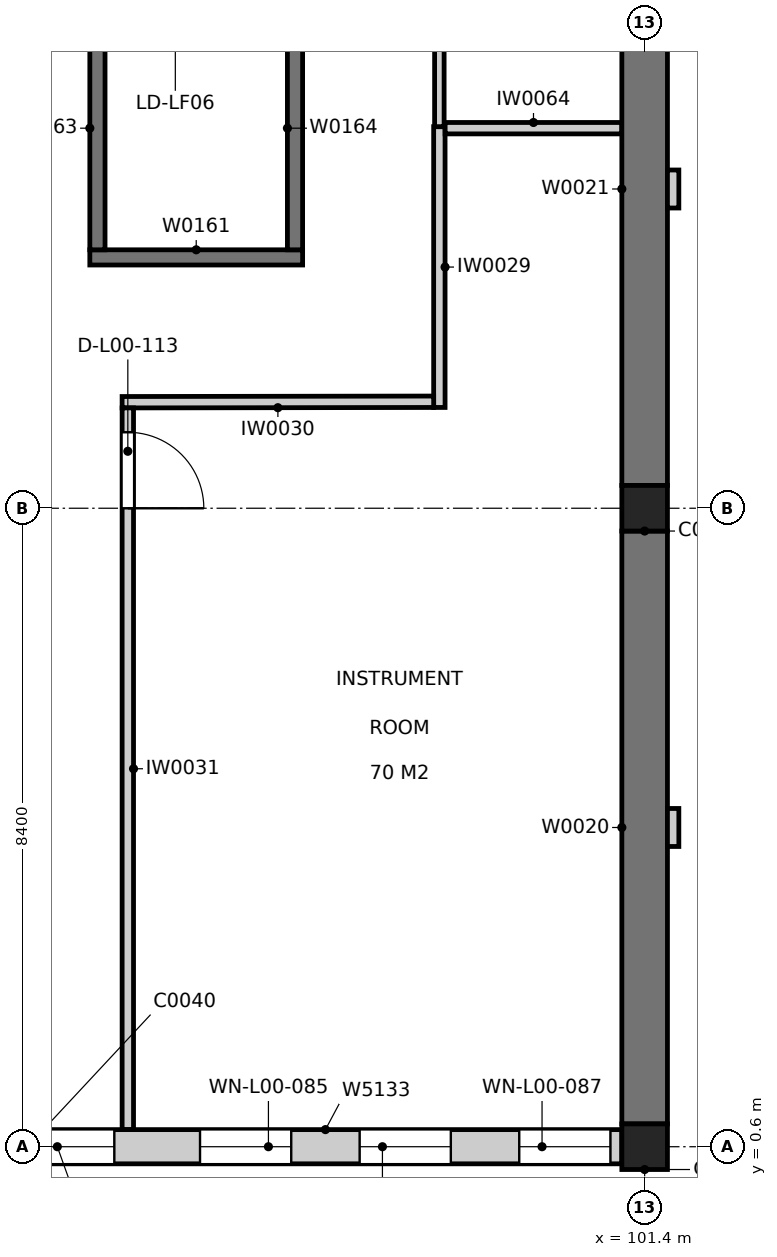
"""IFC4 building model, lengths in metres.
Left out: names, types, materials, properties, quantities, classifications, styles, units other than length and angle.
Written with IfcOpenShell. Run it as: python <this file> out.ifc"""

import sys

from ifc_helpers import new_model, si_unit, direction, frame, frame_2d, origin, origin_2d, place, context, subcontext, project, spatial, rectangle, extrude, element, fill, save


model = new_model("IFC4")
c1 = context("Model", 3, precision=1e-05, world=origin(), true_north=direction((0.0, 1.0)))
c2 = subcontext(c1, "Body", "Model", "MODEL_VIEW")
j1 = project(units=[si_unit("LENGTHUNIT", "METRE"), si_unit("PLANEANGLEUNIT", "RADIAN")], contexts=[c1])
p1 = place(None, origin())
s1 = spatial("IfcSite", under=j1, at=p1, CompositionType="ELEMENT")
p2 = place(p1, origin())
s2 = spatial("IfcBuilding", under=s1, at=p2, CompositionType="ELEMENT")
p3 = place(p2, origin())
s3 = spatial("IfcBuildingStorey", under=s2, at=p3, CompositionType="ELEMENT", Elevation=0.0)
for number, where, z_axis, x_axis in (
    (1, (101.4, 0.6, 0.0), (0.0, 0.0, 1.0), (1.0, 0.0, 0.0)),
    (2, (101.4, 9.0, 0.0), (0.0, 0.0, 1.0), (1.0, 0.0, 0.0)),
):
    element("IfcColumn", number, at=place(p3, frame(where, z_axis=z_axis, x_axis=x_axis)), inside=s3, PredefinedType="COLUMN", context=c2, shape_type="SweptSolid", body=[
        extrude(rectangle(XDim=0.6, YDim=0.6, at=origin_2d()), origin(), (0.0, 0.0, 1.0), 4.8),
    ])
for number, where, z_axis, x_axis in (
    (3, (101.4, 0.9, 0.0), (0.0, 0.0, 1.0), (0.0, 1.0, 0.0)),
    (4, (101.4, 9.3, 0.0), (0.0, 0.0, 1.0), (0.0, 1.0, 0.0)),
):
    element("IfcWall", number, at=place(p3, frame(where, z_axis=z_axis, x_axis=x_axis)), inside=s3, PredefinedType="SOLIDWALL", context=c2, shape_type="SweptSolid", body=[
        extrude(rectangle(XDim=7.8, YDim=0.6, at=frame_2d((3.9, 0.0))), origin(), (0.0, 0.0, 1.0), 4.8),
    ])
p4 = place(p3, frame((94.1, 12.3, 0.0), z_axis=(0.0, 0.0, 1.0), x_axis=(1.0, 0.0, 0.0)))
e5 = element("IfcWall", 5, at=p4, inside=s3, PredefinedType="SOLIDWALL", context=c2, shape_type="SweptSolid", body=[
    extrude(rectangle(XDim=2.8, YDim=0.2, at=frame_2d((1.4, 0.0))), origin(), (0.0, 0.0, 1.0), 4.8),
])
for number, where, z_axis, x_axis in (
    (6, (94.2, 12.4, 0.0), (0.0, 0.0, 1.0), (0.0, 1.0, 0.0)),
    (7, (96.8, 12.4, 0.0), (0.0, 0.0, 1.0), (0.0, 1.0, 0.0)),
):
    element("IfcWall", number, at=place(p3, frame(where, z_axis=z_axis, x_axis=x_axis)), inside=s3, PredefinedType="SOLIDWALL", context=c2, shape_type="SweptSolid", body=[
        extrude(rectangle(XDim=3.2, YDim=0.2, at=frame_2d((1.6, 0.0))), origin(), (0.0, 0.0, 1.0), 4.8),
    ])
p5 = place(p3, frame((98.699, 14.02, 0.0), z_axis=(0.0, 0.0, 1.0), x_axis=(0.0, -1.0, 0.0)))
e8 = element("IfcWall", 8, at=p5, inside=s3, PredefinedType="PARTITIONING", context=c2, shape_type="SweptSolid", body=[
    extrude(rectangle(XDim=3.694, YDim=0.15, at=frame_2d((1.847, 0.0))), origin(), (0.0, 0.0, 1.0), 3.94),
])
p6 = place(p3, frame((98.624, 10.401, 0.0), z_axis=(0.0, 0.0, 1.0), x_axis=(-0.999998891469, -0.001488979886, 0.0)))
e9 = element("IfcWall", 9, at=p6, inside=s3, PredefinedType="PARTITIONING", context=c2, shape_type="SweptSolid", body=[
    extrude(rectangle(XDim=4.099, YDim=0.15, at=frame_2d((2.05, 0.0))), origin(), (0.0, 0.0, 1.0), 4.64),
])
p7 = place(p3, frame((94.6, 10.32, 0.0), z_axis=(0.0, 0.0, 1.0), x_axis=(0.0, -1.0, 0.0)))
e10 = element("IfcWall", 10, at=p7, inside=s3, PredefinedType="PARTITIONING", context=c2, shape_type="SweptSolid", body=[
    extrude(rectangle(XDim=9.495, YDim=0.15, at=frame_2d((4.748, 0.0))), origin(), (0.0, 0.0, 1.0), 3.84),
])
p8 = place(p7, frame((0.321, 0.0, 0.0)))
e11 = element("IfcOpeningElement", 11, at=p8, cuts=e10, PredefinedType="OPENING", context=c2, shape_type="SweptSolid", body=[
    extrude(rectangle(XDim=1.0, YDim=2.1, at=frame_2d((0.5, 1.05))), frame((0.0, 0.085, 0.0), z_axis=(0.0, -1.0, 0.0), x_axis=(1.0, 0.0, 0.0)), (0.0, 0.0, 1.0), 0.17),
])
p9 = place(p3, frame((98.699, 17.537, 0.0), z_axis=(0.0, 0.0, 1.0), x_axis=(0.0, -1.0, 0.0)))
e12 = element("IfcWall", 12, at=p9, inside=s3, PredefinedType="PARTITIONING", context=c2, shape_type="SweptSolid", body=[
    extrude(rectangle(XDim=3.517, YDim=0.125, at=frame_2d((1.758, 0.0))), origin(), (0.0, 0.0, 1.0), 3.84),
])
p10 = place(p3, frame((98.775, 14.0, 0.0), z_axis=(0.0, 0.0, 1.0), x_axis=(1.0, 0.0, 0.0)))
e13 = element("IfcWall", 13, at=p10, inside=s3, PredefinedType="PARTITIONING", context=c2, shape_type="SweptSolid", body=[
    extrude(rectangle(XDim=2.325, YDim=0.15, at=frame_2d((1.163, 0.0))), origin(), (0.0, 0.0, 1.0), 4.64),
])
p11 = place(p3, frame((93.3, 0.6, 0.0), z_axis=(0.0, 0.0, 1.0), x_axis=(1.0, 0.0, 0.0)))
e14 = element("IfcWall", 14, at=p11, inside=s3, PredefinedType="SOLIDWALL", context=c2, shape_type="SweptSolid", body=[
    extrude(rectangle(XDim=7.8, YDim=0.45, at=frame_2d((3.9, 0.0))), origin(), (0.0, 0.0, 1.0), 3.84),
])
p12 = place(p11, frame((0.123, 0.0, 0.9)))
e15 = element("IfcOpeningElement", 15, at=p12, cuts=e14, PredefinedType="OPENING", context=c2, shape_type="SweptSolid", body=[
    extrude(rectangle(XDim=1.0, YDim=2.4, at=frame_2d((0.5, 1.2))), frame((0.0, 0.235, 0.0), z_axis=(0.0, -1.0, 0.0), x_axis=(1.0, 0.0, 0.0)), (0.0, 0.0, 1.0), 0.47),
])
p13 = place(p11, frame((2.25, 0.0, 0.9)))
e16 = element("IfcOpeningElement", 16, at=p13, cuts=e14, PredefinedType="OPENING", context=c2, shape_type="SweptSolid", body=[
    extrude(rectangle(XDim=1.2, YDim=2.4, at=frame_2d((0.6, 1.2))), frame((0.0, 0.235, 0.0), z_axis=(0.0, -1.0, 0.0), x_axis=(1.0, 0.0, 0.0)), (0.0, 0.0, 1.0), 0.47),
])
p14 = place(p11, frame((4.35, 0.0, 0.9)))
e17 = element("IfcOpeningElement", 17, at=p14, cuts=e14, PredefinedType="OPENING", context=c2, shape_type="SweptSolid", body=[
    extrude(rectangle(XDim=1.2, YDim=2.4, at=frame_2d((0.6, 1.2))), frame((0.0, 0.235, 0.0), z_axis=(0.0, -1.0, 0.0), x_axis=(1.0, 0.0, 0.0)), (0.0, 0.0, 1.0), 0.47),
])
p15 = place(p11, frame((6.45, 0.0, 0.9)))
e18 = element("IfcOpeningElement", 18, at=p15, cuts=e14, PredefinedType="OPENING", context=c2, shape_type="SweptSolid", body=[
    extrude(rectangle(XDim=1.2, YDim=2.4, at=frame_2d((0.6, 1.2))), frame((0.0, 0.235, 0.0), z_axis=(0.0, -1.0, 0.0), x_axis=(1.0, 0.0, 0.0)), (0.0, 0.0, 1.0), 0.47),
])
for number, where, z_axis, x_axis in (
    (19, (101.775, 4.55, 0.0), (0.0, 0.0, 1.0), (0.0, 1.0, 0.0)),
    (20, (101.775, 12.95, 0.0), (0.0, 0.0, 1.0), (0.0, 1.0, 0.0)),
):
    element("IfcWall", number, at=place(p3, frame(where, z_axis=z_axis, x_axis=x_axis)), inside=s3, PredefinedType="SOLIDWALL", context=c2, shape_type="SweptSolid", body=[
        extrude(rectangle(XDim=0.5, YDim=0.15, at=frame_2d((0.25, 0.0))), origin(), (0.0, 0.0, 1.0), 4.8),
    ])
p16 = place(p8, origin())
e21 = element("IfcDoor", 21, at=p16, inside=s3, OperationType="SINGLE_SWING_RIGHT", PredefinedType="DOOR", context=c2, shape_type="SweptSolid", body=[
    extrude(rectangle(XDim=1.0, YDim=2.1, at=frame_2d((0.5, 1.05))), frame((0.0, 0.025, 0.0), z_axis=(0.0, -1.0, 0.0), x_axis=(1.0, 0.0, 0.0)), (0.0, 0.0, 1.0), 0.05),
])
fill(e11, e21)
p17 = place(p12, origin())
e22 = element("IfcWindow", 22, at=p17, inside=s3, PartitioningType="SINGLE_PANEL", PredefinedType="WINDOW", context=c2, shape_type="SweptSolid", body=[
    extrude(rectangle(XDim=1.0, YDim=2.4, at=frame_2d((0.5, 1.2))), frame((0.0, 0.135, 0.0), z_axis=(0.0, -1.0, 0.0), x_axis=(1.0, 0.0, 0.0)), (0.0, 0.0, 1.0), 0.06),
])
fill(e15, e22)
p18 = place(p13, origin())
e23 = element("IfcWindow", 23, at=p18, inside=s3, PartitioningType="SINGLE_PANEL", PredefinedType="WINDOW", context=c2, shape_type="SweptSolid", body=[
    extrude(rectangle(XDim=1.2, YDim=2.4, at=frame_2d((0.6, 1.2))), frame((0.0, 0.135, 0.0), z_axis=(0.0, -1.0, 0.0), x_axis=(1.0, 0.0, 0.0)), (0.0, 0.0, 1.0), 0.06),
])
fill(e16, e23)
p19 = place(p14, origin())
e24 = element("IfcWindow", 24, at=p19, inside=s3, PartitioningType="SINGLE_PANEL", PredefinedType="WINDOW", context=c2, shape_type="SweptSolid", body=[
    extrude(rectangle(XDim=1.2, YDim=2.4, at=frame_2d((0.6, 1.2))), frame((0.0, 0.135, 0.0), z_axis=(0.0, -1.0, 0.0), x_axis=(1.0, 0.0, 0.0)), (0.0, 0.0, 1.0), 0.06),
])
fill(e17, e24)
p20 = place(p15, origin())
e25 = element("IfcWindow", 25, at=p20, inside=s3, PartitioningType="SINGLE_PANEL", PredefinedType="WINDOW", context=c2, shape_type="SweptSolid", body=[
    extrude(rectangle(XDim=1.2, YDim=2.4, at=frame_2d((0.6, 1.2))), frame((0.0, 0.135, 0.0), z_axis=(0.0, -1.0, 0.0), x_axis=(1.0, 0.0, 0.0)), (0.0, 0.0, 1.0), 0.06),
])
fill(e18, e25)
save(model, sys.argv[1])
